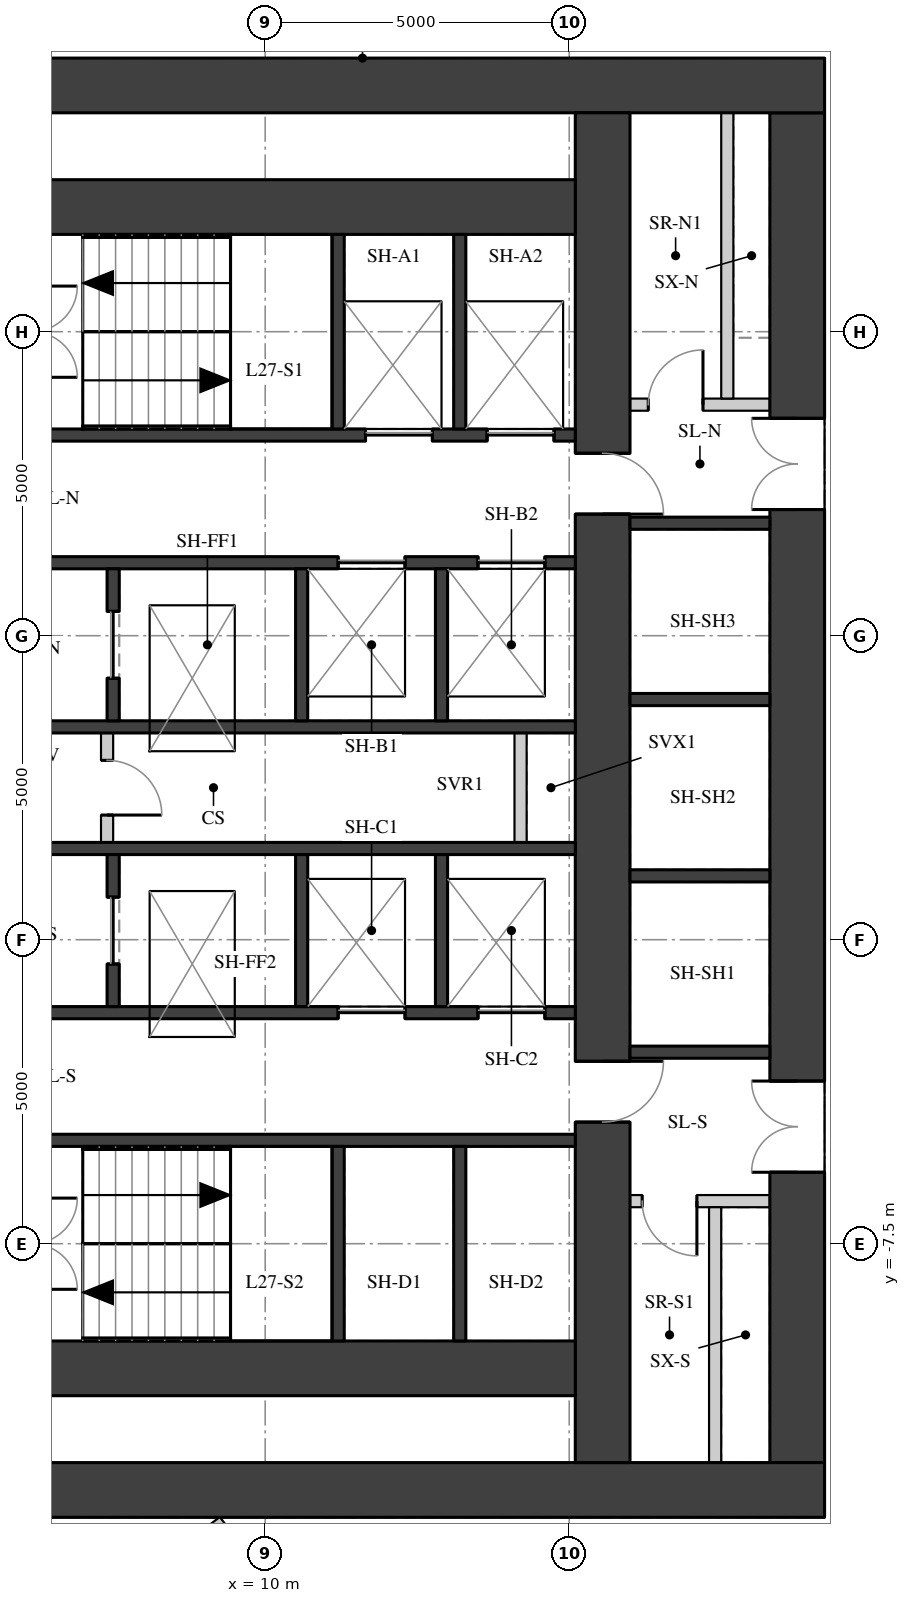
"""IFC4 building model, lengths in metres.
Left out: names, types, materials, properties, quantities, classifications, styles, units other than length and angle.
Written with IfcOpenShell. Run it as: python <this file> out.ifc"""

import sys

from ifc_helpers import new_model, si_unit, direction, frame, frame_2d, origin, place, context, subcontext, project, spatial, rectangle, extrude, element, fill, save


model = new_model("IFC4")
c1 = context("Model", 3, precision=1e-05, world=origin(), true_north=direction((0.0, 1.0)))
c2 = subcontext(c1, "Body", "Model", "MODEL_VIEW")
j1 = project(units=[si_unit("LENGTHUNIT", "METRE"), si_unit("PLANEANGLEUNIT", "RADIAN")], contexts=[c1])
p1 = place(None, origin())
s1 = spatial("IfcSite", under=j1, at=p1, CompositionType="ELEMENT")
p2 = place(p1, origin())
s2 = spatial("IfcBuilding", under=s1, at=p2, CompositionType="ELEMENT")
p3 = place(p2, frame((0.0, 0.0, 98.8)))
s3 = spatial("IfcBuildingStorey", under=s2, at=p3, CompositionType="ELEMENT", Elevation=98.8)
p4 = place(p3, frame((18.75, -11.1, 0.0), z_axis=(0.0, 0.0, 1.0), x_axis=(0.0, 1.0, 0.0)))
e1 = element("IfcWall", 1, at=p4, inside=s3, PredefinedType="SHEAR", context=c2, shape_type="SweptSolid", body=[
    extrude(rectangle(XDim=22.2, YDim=0.9, at=frame_2d((11.1, 0.0))), origin(), (0.0, 0.0, 1.0), 3.02),
])
p5 = place(p4, frame((15.675, 0.0, 0.0)))
e2 = element("IfcOpeningElement", 2, at=p5, cuts=e1, PredefinedType="OPENING", context=c2, shape_type="SweptSolid", body=[
    extrude(rectangle(XDim=1.5, YDim=2.1, at=frame_2d((0.75, 1.05))), frame((0.0, 0.46, 0.0), z_axis=(0.0, -1.0, 0.0), x_axis=(1.0, 0.0, 0.0)), (0.0, 0.0, 1.0), 0.92),
])
p6 = place(p4, frame((4.775, 0.0, 0.0)))
e3 = element("IfcOpeningElement", 3, at=p6, cuts=e1, PredefinedType="OPENING", context=c2, shape_type="SweptSolid", body=[
    extrude(rectangle(XDim=1.5, YDim=2.1, at=frame_2d((0.75, 1.05))), frame((0.0, 0.46, 0.0), z_axis=(0.0, -1.0, 0.0), x_axis=(1.0, 0.0, 0.0)), (0.0, 0.0, 1.0), 0.92),
])
for number, where, z_axis, x_axis in (
    (4, (4.0, 11.55, 0.0), (0.0, 0.0, 1.0), (1.0, 0.0, 0.0)),
    (5, (4.0, -11.55, 0.0), (0.0, 0.0, 1.0), (1.0, 0.0, 0.0)),
):
    element("IfcWall", number, at=place(p3, frame(where, z_axis=z_axis, x_axis=x_axis)), inside=s3, PredefinedType="SHEAR", context=c2, shape_type="SweptSolid", body=[
        extrude(rectangle(XDim=15.2, YDim=0.9, at=frame_2d((7.6, 0.0))), origin(), (0.0, 0.0, 1.0), 3.02),
    ])
p7 = place(p3, frame((15.55, -11.1, 0.0), z_axis=(0.0, 0.0, 1.0), x_axis=(0.0, 1.0, 0.0)))
e6 = element("IfcWall", 6, at=p7, inside=s3, PredefinedType="SHEAR", context=c2, shape_type="SweptSolid", body=[
    extrude(rectangle(XDim=22.2, YDim=0.9, at=frame_2d((11.1, 0.0))), origin(), (0.0, 0.0, 1.0), 3.02),
])
p8 = place(p7, frame((15.6, 0.0, 0.0)))
e7 = element("IfcOpeningElement", 7, at=p8, cuts=e6, PredefinedType="OPENING", context=c2, shape_type="SweptSolid", body=[
    extrude(rectangle(XDim=1.0, YDim=2.1, at=frame_2d((0.5, 1.05))), frame((0.0, 0.46, 0.0), z_axis=(0.0, -1.0, 0.0), x_axis=(1.0, 0.0, 0.0)), (0.0, 0.0, 1.0), 0.92),
])
p9 = place(p7, frame((5.6, 0.0, 0.0)))
e8 = element("IfcOpeningElement", 8, at=p9, cuts=e6, PredefinedType="OPENING", context=c2, shape_type="SweptSolid", body=[
    extrude(rectangle(XDim=1.0, YDim=2.1, at=frame_2d((0.5, 1.05))), frame((0.0, 0.46, 0.0), z_axis=(0.0, -1.0, 0.0), x_axis=(1.0, 0.0, 0.0)), (0.0, 0.0, 1.0), 0.92),
])
for number, where, z_axis, x_axis in (
    (9, (4.9, 9.55, 0.0), (0.0, 0.0, 1.0), (1.0, 0.0, 0.0)),
    (10, (4.9, -9.55, 0.0), (0.0, 0.0, 1.0), (1.0, 0.0, 0.0)),
):
    element("IfcWall", number, at=place(p3, frame(where, z_axis=z_axis, x_axis=x_axis)), inside=s3, PredefinedType="SHEAR", context=c2, shape_type="SweptSolid", body=[
        extrude(rectangle(XDim=10.2, YDim=0.9, at=frame_2d((5.1, 0.0))), origin(), (0.0, 0.0, 1.0), 3.02),
    ])
p10 = place(p3, frame((4.9, 5.8, 0.0), z_axis=(0.0, 0.0, 1.0), x_axis=(1.0, 0.0, 0.0)))
e11 = element("IfcWall", 11, at=p10, inside=s3, PredefinedType="SHEAR", context=c2, shape_type="SweptSolid", body=[
    extrude(rectangle(XDim=10.2, YDim=0.2, at=frame_2d((5.1, 0.0))), origin(), (0.0, 0.0, 1.0), 3.02),
])
p11 = place(p10, frame((6.75, 0.0, 0.0)))
e12 = element("IfcOpeningElement", 12, at=p11, cuts=e11, PredefinedType="OPENING", context=c2, shape_type="SweptSolid", body=[
    extrude(rectangle(XDim=1.1, YDim=2.1, at=frame_2d((0.55, 1.05))), frame((0.0, 0.11, 0.0), z_axis=(0.0, -1.0, 0.0), x_axis=(1.0, 0.0, 0.0)), (0.0, 0.0, 1.0), 0.22),
])
p12 = place(p10, frame((8.75, 0.0, 0.0)))
e13 = element("IfcOpeningElement", 13, at=p12, cuts=e11, PredefinedType="OPENING", context=c2, shape_type="SweptSolid", body=[
    extrude(rectangle(XDim=1.1, YDim=2.1, at=frame_2d((0.55, 1.05))), frame((0.0, 0.11, 0.0), z_axis=(0.0, -1.0, 0.0), x_axis=(1.0, 0.0, 0.0)), (0.0, 0.0, 1.0), 0.22),
])
p13 = place(p3, frame((4.9, 3.7, 0.0), z_axis=(0.0, 0.0, 1.0), x_axis=(1.0, 0.0, 0.0)))
e14 = element("IfcWall", 14, at=p13, inside=s3, PredefinedType="SHEAR", context=c2, shape_type="SweptSolid", body=[
    extrude(rectangle(XDim=10.2, YDim=0.2, at=frame_2d((5.1, 0.0))), origin(), (0.0, 0.0, 1.0), 3.02),
])
p14 = place(p13, frame((6.3, 0.0, 0.0)))
e15 = element("IfcOpeningElement", 15, at=p14, cuts=e14, PredefinedType="OPENING", context=c2, shape_type="SweptSolid", body=[
    extrude(rectangle(XDim=1.1, YDim=2.1, at=frame_2d((0.55, 1.05))), frame((0.0, 0.11, 0.0), z_axis=(0.0, -1.0, 0.0), x_axis=(1.0, 0.0, 0.0)), (0.0, 0.0, 1.0), 0.22),
])
p15 = place(p13, frame((8.6, 0.0, 0.0)))
e16 = element("IfcOpeningElement", 16, at=p15, cuts=e14, PredefinedType="OPENING", context=c2, shape_type="SweptSolid", body=[
    extrude(rectangle(XDim=1.1, YDim=2.1, at=frame_2d((0.55, 1.05))), frame((0.0, 0.11, 0.0), z_axis=(0.0, -1.0, 0.0), x_axis=(1.0, 0.0, 0.0)), (0.0, 0.0, 1.0), 0.22),
])
for number, where, z_axis, x_axis in (
    (17, (4.9, 1.0, 0.0), (0.0, 0.0, 1.0), (1.0, 0.0, 0.0)),
    (18, (4.9, -1.0, 0.0), (0.0, 0.0, 1.0), (1.0, 0.0, 0.0)),
):
    element("IfcWall", number, at=place(p3, frame(where, z_axis=z_axis, x_axis=x_axis)), inside=s3, PredefinedType="SHEAR", context=c2, shape_type="SweptSolid", body=[
        extrude(rectangle(XDim=10.2, YDim=0.2, at=frame_2d((5.1, 0.0))), origin(), (0.0, 0.0, 1.0), 3.02),
    ])
p16 = place(p3, frame((4.9, -3.7, 0.0), z_axis=(0.0, 0.0, 1.0), x_axis=(1.0, 0.0, 0.0)))
e19 = element("IfcWall", 19, at=p16, inside=s3, PredefinedType="SHEAR", context=c2, shape_type="SweptSolid", body=[
    extrude(rectangle(XDim=10.2, YDim=0.2, at=frame_2d((5.1, 0.0))), origin(), (0.0, 0.0, 1.0), 3.02),
])
p17 = place(p16, frame((6.3, 0.0, 0.0)))
e20 = element("IfcOpeningElement", 20, at=p17, cuts=e19, PredefinedType="OPENING", context=c2, shape_type="SweptSolid", body=[
    extrude(rectangle(XDim=1.1, YDim=2.1, at=frame_2d((0.55, 1.05))), frame((0.0, 0.11, 0.0), z_axis=(0.0, -1.0, 0.0), x_axis=(1.0, 0.0, 0.0)), (0.0, 0.0, 1.0), 0.22),
])
p18 = place(p16, frame((8.6, 0.0, 0.0)))
e21 = element("IfcOpeningElement", 21, at=p18, cuts=e19, PredefinedType="OPENING", context=c2, shape_type="SweptSolid", body=[
    extrude(rectangle(XDim=1.1, YDim=2.1, at=frame_2d((0.55, 1.05))), frame((0.0, 0.11, 0.0), z_axis=(0.0, -1.0, 0.0), x_axis=(1.0, 0.0, 0.0)), (0.0, 0.0, 1.0), 0.22),
])
p19 = place(p3, frame((4.9, -5.8, 0.0), z_axis=(0.0, 0.0, 1.0), x_axis=(1.0, 0.0, 0.0)))
e22 = element("IfcWall", 22, at=p19, inside=s3, PredefinedType="SHEAR", context=c2, shape_type="SweptSolid", body=[
    extrude(rectangle(XDim=10.2, YDim=0.2, at=frame_2d((5.1, 0.0))), origin(), (0.0, 0.0, 1.0), 3.02),
])
for number, where, z_axis, x_axis in (
    (23, (11.2, 5.9, 0.0), (0.0, 0.0, 1.0), (0.0, 1.0, 0.0)),
    (24, (11.2, -9.1, 0.0), (0.0, 0.0, 1.0), (0.0, 1.0, 0.0)),
    (25, (13.2, 5.9, 0.0), (0.0, 0.0, 1.0), (0.0, 1.0, 0.0)),
    (26, (13.2, -9.1, 0.0), (0.0, 0.0, 1.0), (0.0, 1.0, 0.0)),
):
    element("IfcWall", number, at=place(p3, frame(where, z_axis=z_axis, x_axis=x_axis)), inside=s3, PredefinedType="SHEAR", context=c2, shape_type="SweptSolid", body=[
        extrude(rectangle(XDim=3.2, YDim=0.2, at=frame_2d((1.6, 0.0))), origin(), (0.0, 0.0, 1.0), 3.02),
    ])
p20 = place(p3, frame((7.5, 1.1, 0.0), z_axis=(0.0, 0.0, 1.0), x_axis=(0.0, 1.0, 0.0)))
e27 = element("IfcWall", 27, at=p20, inside=s3, PredefinedType="SHEAR", context=c2, shape_type="SweptSolid", body=[
    extrude(rectangle(XDim=2.5, YDim=0.2, at=frame_2d((1.25, 0.0))), origin(), (0.0, 0.0, 1.0), 3.02),
])
p21 = place(p20, frame((0.7, 0.0, 0.0)))
e28 = element("IfcOpeningElement", 28, at=p21, cuts=e27, PredefinedType="OPENING", context=c2, shape_type="SweptSolid", body=[
    extrude(rectangle(XDim=1.1, YDim=2.1, at=frame_2d((0.55, 1.05))), frame((0.0, 0.11, 0.0), z_axis=(0.0, -1.0, 0.0), x_axis=(1.0, 0.0, 0.0)), (0.0, 0.0, 1.0), 0.22),
])
p22 = place(p3, frame((7.5, -3.6, 0.0), z_axis=(0.0, 0.0, 1.0), x_axis=(0.0, 1.0, 0.0)))
e29 = element("IfcWall", 29, at=p22, inside=s3, PredefinedType="SHEAR", context=c2, shape_type="SweptSolid", body=[
    extrude(rectangle(XDim=2.5, YDim=0.2, at=frame_2d((1.25, 0.0))), origin(), (0.0, 0.0, 1.0), 3.02),
])
p23 = place(p22, frame((0.7, 0.0, 0.0)))
e30 = element("IfcOpeningElement", 30, at=p23, cuts=e29, PredefinedType="OPENING", context=c2, shape_type="SweptSolid", body=[
    extrude(rectangle(XDim=1.1, YDim=2.1, at=frame_2d((0.55, 1.05))), frame((0.0, 0.11, 0.0), z_axis=(0.0, -1.0, 0.0), x_axis=(1.0, 0.0, 0.0)), (0.0, 0.0, 1.0), 0.22),
])
for number, where, z_axis, x_axis in (
    (31, (10.6, 1.1, 0.0), (0.0, 0.0, 1.0), (0.0, 1.0, 0.0)),
    (32, (10.6, -3.6, 0.0), (0.0, 0.0, 1.0), (0.0, 1.0, 0.0)),
    (33, (12.9, 1.1, 0.0), (0.0, 0.0, 1.0), (0.0, 1.0, 0.0)),
    (34, (12.9, -3.6, 0.0), (0.0, 0.0, 1.0), (0.0, 1.0, 0.0)),
):
    element("IfcWall", number, at=place(p3, frame(where, z_axis=z_axis, x_axis=x_axis)), inside=s3, PredefinedType="SHEAR", context=c2, shape_type="SweptSolid", body=[
        extrude(rectangle(XDim=2.5, YDim=0.2, at=frame_2d((1.25, 0.0))), origin(), (0.0, 0.0, 1.0), 3.02),
    ])
p24 = place(p3, frame((7.4, -0.9, 0.0), z_axis=(0.0, 0.0, 1.0), x_axis=(0.0, 1.0, 0.0)))
e35 = element("IfcWall", 35, at=p24, inside=s3, PredefinedType="PARTITIONING", context=c2, shape_type="SweptSolid", body=[
    extrude(rectangle(XDim=1.8, YDim=0.2, at=frame_2d((0.9, 0.0))), origin(), (0.0, 0.0, 1.0), 3.02),
])
p25 = place(p24, frame((0.45, 0.0, 0.0)))
e36 = element("IfcOpeningElement", 36, at=p25, cuts=e35, PredefinedType="OPENING", context=c2, shape_type="SweptSolid", body=[
    extrude(rectangle(XDim=0.9, YDim=2.1, at=frame_2d((0.45, 1.05))), frame((0.0, 0.11, 0.0), z_axis=(0.0, -1.0, 0.0), x_axis=(1.0, 0.0, 0.0)), (0.0, 0.0, 1.0), 0.22),
])
p26 = place(p3, frame((14.2, -0.9, 0.0), z_axis=(0.0, 0.0, 1.0), x_axis=(0.0, 1.0, 0.0)))
e37 = element("IfcWall", 37, at=p26, inside=s3, PredefinedType="PARTITIONING", context=c2, shape_type="SweptSolid", body=[
    extrude(rectangle(XDim=1.8, YDim=0.2, at=frame_2d((0.9, 0.0))), origin(), (0.0, 0.0, 1.0), 3.02),
])
for number, where, z_axis, x_axis in (
    (38, (16.0, -4.35, 0.0), (0.0, 0.0, 1.0), (1.0, 0.0, 0.0)),
    (39, (16.0, -1.45, 0.0), (0.0, 0.0, 1.0), (1.0, 0.0, 0.0)),
    (40, (16.0, 1.45, 0.0), (0.0, 0.0, 1.0), (1.0, 0.0, 0.0)),
    (41, (16.0, 4.35, 0.0), (0.0, 0.0, 1.0), (1.0, 0.0, 0.0)),
):
    element("IfcWall", number, at=place(p3, frame(where, z_axis=z_axis, x_axis=x_axis)), inside=s3, PredefinedType="SHEAR", context=c2, shape_type="SweptSolid", body=[
        extrude(rectangle(XDim=2.3, YDim=0.2, at=frame_2d((1.15, 0.0))), origin(), (0.0, 0.0, 1.0), 3.02),
    ])
p27 = place(p3, frame((16.0, 6.3, 0.0), z_axis=(0.0, 0.0, 1.0), x_axis=(1.0, 0.0, 0.0)))
e42 = element("IfcWall", 42, at=p27, inside=s3, PredefinedType="PARTITIONING", context=c2, shape_type="SweptSolid", body=[
    extrude(rectangle(XDim=2.3, YDim=0.2, at=frame_2d((1.15, 0.0))), origin(), (0.0, 0.0, 1.0), 3.02),
])
p28 = place(p27, frame((0.3, 0.0, 0.0)))
e43 = element("IfcOpeningElement", 43, at=p28, cuts=e42, PredefinedType="OPENING", context=c2, shape_type="SweptSolid", body=[
    extrude(rectangle(XDim=0.9, YDim=2.1, at=frame_2d((0.45, 1.05))), frame((0.0, 0.11, 0.0), z_axis=(0.0, -1.0, 0.0), x_axis=(1.0, 0.0, 0.0)), (0.0, 0.0, 1.0), 0.22),
])
p29 = place(p3, frame((17.6, 6.4, 0.0), z_axis=(0.0, 0.0, 1.0), x_axis=(0.0, 1.0, 0.0)))
e44 = element("IfcWall", 44, at=p29, inside=s3, PredefinedType="PARTITIONING", context=c2, shape_type="SweptSolid", body=[
    extrude(rectangle(XDim=4.7, YDim=0.2, at=frame_2d((2.35, 0.0))), origin(), (0.0, 0.0, 1.0), 3.02),
])
p30 = place(p3, frame((16.0, -6.8, 0.0), z_axis=(0.0, 0.0, 1.0), x_axis=(1.0, 0.0, 0.0)))
e45 = element("IfcWall", 45, at=p30, inside=s3, PredefinedType="PARTITIONING", context=c2, shape_type="SweptSolid", body=[
    extrude(rectangle(XDim=2.3, YDim=0.2, at=frame_2d((1.15, 0.0))), origin(), (0.0, 0.0, 1.0), 3.02),
])
p31 = place(p30, frame((0.2, 0.0, 0.0)))
e46 = element("IfcOpeningElement", 46, at=p31, cuts=e45, PredefinedType="OPENING", context=c2, shape_type="SweptSolid", body=[
    extrude(rectangle(XDim=0.9, YDim=2.1, at=frame_2d((0.45, 1.05))), frame((0.0, 0.11, 0.0), z_axis=(0.0, -1.0, 0.0), x_axis=(1.0, 0.0, 0.0)), (0.0, 0.0, 1.0), 0.22),
])
p32 = place(p3, frame((17.4, -11.1, 0.0), z_axis=(0.0, 0.0, 1.0), x_axis=(0.0, 1.0, 0.0)))
e47 = element("IfcWall", 47, at=p32, inside=s3, PredefinedType="PARTITIONING", context=c2, shape_type="SweptSolid", body=[
    extrude(rectangle(XDim=4.2, YDim=0.2, at=frame_2d((2.1, 0.0))), origin(), (0.0, 0.0, 1.0), 3.02),
])
p33 = place(p3, frame((9.3, -12.055, 0.0), z_axis=(0.0, 0.0, 1.0), x_axis=(-0.79762360872, -0.603155517933, 0.0)))
e48 = element("IfcWall", 48, at=p33, inside=s3, PredefinedType="PARTITIONING", context=c2, shape_type="SweptSolid", body=[
    extrude(rectangle(XDim=3.288, YDim=0.15, at=frame_2d((1.644, 0.0))), origin(), (0.0, 0.0, 1.0), 3.02),
])
p34 = place(p5, origin())
e49 = element("IfcDoor", 49, at=p34, inside=s3, OperationType="DOUBLE_DOOR_SINGLE_SWING", PredefinedType="DOOR", context=c2, shape_type="SweptSolid", body=[
    extrude(rectangle(XDim=1.5, YDim=2.1, at=frame_2d((0.75, 1.05))), frame((0.0, 0.025, 0.0), z_axis=(0.0, -1.0, 0.0), x_axis=(1.0, 0.0, 0.0)), (0.0, 0.0, 1.0), 0.05),
])
fill(e2, e49)
p35 = place(p6, origin())
e50 = element("IfcDoor", 50, at=p35, inside=s3, OperationType="DOUBLE_DOOR_SINGLE_SWING", PredefinedType="DOOR", context=c2, shape_type="SweptSolid", body=[
    extrude(rectangle(XDim=1.5, YDim=2.1, at=frame_2d((0.75, 1.05))), frame((0.0, 0.025, 0.0), z_axis=(0.0, -1.0, 0.0), x_axis=(1.0, 0.0, 0.0)), (0.0, 0.0, 1.0), 0.05),
])
fill(e3, e50)
p36 = place(p11, origin())
e51 = element("IfcDoor", 51, at=p36, inside=s3, OperationType="DOUBLE_DOOR_SLIDING", PredefinedType="DOOR", context=c2, shape_type="SweptSolid", body=[
    extrude(rectangle(XDim=1.1, YDim=2.1, at=frame_2d((0.55, 1.05))), frame((0.0, 0.025, 0.0), z_axis=(0.0, -1.0, 0.0), x_axis=(1.0, 0.0, 0.0)), (0.0, 0.0, 1.0), 0.05),
])
fill(e12, e51)
p37 = place(p12, origin())
e52 = element("IfcDoor", 52, at=p37, inside=s3, OperationType="DOUBLE_DOOR_SLIDING", PredefinedType="DOOR", context=c2, shape_type="SweptSolid", body=[
    extrude(rectangle(XDim=1.1, YDim=2.1, at=frame_2d((0.55, 1.05))), frame((0.0, 0.025, 0.0), z_axis=(0.0, -1.0, 0.0), x_axis=(1.0, 0.0, 0.0)), (0.0, 0.0, 1.0), 0.05),
])
fill(e13, e52)
p38 = place(p14, origin())
e53 = element("IfcDoor", 53, at=p38, inside=s3, OperationType="DOUBLE_DOOR_SLIDING", PredefinedType="DOOR", context=c2, shape_type="SweptSolid", body=[
    extrude(rectangle(XDim=1.1, YDim=2.1, at=frame_2d((0.55, 1.05))), frame((0.0, 0.025, 0.0), z_axis=(0.0, -1.0, 0.0), x_axis=(1.0, 0.0, 0.0)), (0.0, 0.0, 1.0), 0.05),
])
fill(e15, e53)
p39 = place(p15, origin())
e54 = element("IfcDoor", 54, at=p39, inside=s3, OperationType="DOUBLE_DOOR_SLIDING", PredefinedType="DOOR", context=c2, shape_type="SweptSolid", body=[
    extrude(rectangle(XDim=1.1, YDim=2.1, at=frame_2d((0.55, 1.05))), frame((0.0, 0.025, 0.0), z_axis=(0.0, -1.0, 0.0), x_axis=(1.0, 0.0, 0.0)), (0.0, 0.0, 1.0), 0.05),
])
fill(e16, e54)
p40 = place(p17, origin())
e55 = element("IfcDoor", 55, at=p40, inside=s3, OperationType="DOUBLE_DOOR_SLIDING", PredefinedType="DOOR", context=c2, shape_type="SweptSolid", body=[
    extrude(rectangle(XDim=1.1, YDim=2.1, at=frame_2d((0.55, 1.05))), frame((0.0, 0.025, 0.0), z_axis=(0.0, -1.0, 0.0), x_axis=(1.0, 0.0, 0.0)), (0.0, 0.0, 1.0), 0.05),
])
fill(e20, e55)
p41 = place(p18, origin())
e56 = element("IfcDoor", 56, at=p41, inside=s3, OperationType="DOUBLE_DOOR_SLIDING", PredefinedType="DOOR", context=c2, shape_type="SweptSolid", body=[
    extrude(rectangle(XDim=1.1, YDim=2.1, at=frame_2d((0.55, 1.05))), frame((0.0, 0.025, 0.0), z_axis=(0.0, -1.0, 0.0), x_axis=(1.0, 0.0, 0.0)), (0.0, 0.0, 1.0), 0.05),
])
fill(e21, e56)
p42 = place(p21, origin())
e57 = element("IfcDoor", 57, at=p42, inside=s3, OperationType="DOUBLE_DOOR_SLIDING", PredefinedType="DOOR", context=c2, shape_type="SweptSolid", body=[
    extrude(rectangle(XDim=1.1, YDim=2.1, at=frame_2d((0.55, 1.05))), frame((0.0, 0.025, 0.0), z_axis=(0.0, -1.0, 0.0), x_axis=(1.0, 0.0, 0.0)), (0.0, 0.0, 1.0), 0.05),
])
fill(e28, e57)
p43 = place(p23, origin())
e58 = element("IfcDoor", 58, at=p43, inside=s3, OperationType="DOUBLE_DOOR_SLIDING", PredefinedType="DOOR", context=c2, shape_type="SweptSolid", body=[
    extrude(rectangle(XDim=1.1, YDim=2.1, at=frame_2d((0.55, 1.05))), frame((0.0, 0.025, 0.0), z_axis=(0.0, -1.0, 0.0), x_axis=(1.0, 0.0, 0.0)), (0.0, 0.0, 1.0), 0.05),
])
fill(e30, e58)
p44 = place(p25, origin())
e59 = element("IfcDoor", 59, at=p44, inside=s3, OperationType="SINGLE_SWING_RIGHT", PredefinedType="DOOR", context=c2, shape_type="SweptSolid", body=[
    extrude(rectangle(XDim=0.9, YDim=2.1, at=frame_2d((0.45, 1.05))), frame((0.0, 0.025, 0.0), z_axis=(0.0, -1.0, 0.0), x_axis=(1.0, 0.0, 0.0)), (0.0, 0.0, 1.0), 0.05),
])
fill(e36, e59)
p45 = place(p8, origin())
e60 = element("IfcDoor", 60, at=p45, inside=s3, OperationType="SINGLE_SWING_RIGHT", PredefinedType="DOOR", context=c2, shape_type="SweptSolid", body=[
    extrude(rectangle(XDim=1.0, YDim=2.1, at=frame_2d((0.5, 1.05))), frame((0.0, 0.025, 0.0), z_axis=(0.0, -1.0, 0.0), x_axis=(1.0, 0.0, 0.0)), (0.0, 0.0, 1.0), 0.05),
])
fill(e7, e60)
p46 = place(p28, origin())
e61 = element("IfcDoor", 61, at=p46, inside=s3, OperationType="SINGLE_SWING_RIGHT", PredefinedType="DOOR", context=c2, shape_type="SweptSolid", body=[
    extrude(rectangle(XDim=0.9, YDim=2.1, at=frame_2d((0.45, 1.05))), frame((0.0, 0.025, 0.0), z_axis=(0.0, -1.0, 0.0), x_axis=(1.0, 0.0, 0.0)), (0.0, 0.0, 1.0), 0.05),
])
fill(e43, e61)
p47 = place(p9, origin())
e62 = element("IfcDoor", 62, at=p47, inside=s3, OperationType="SINGLE_SWING_LEFT", PredefinedType="DOOR", context=c2, shape_type="SweptSolid", body=[
    extrude(rectangle(XDim=1.0, YDim=2.1, at=frame_2d((0.5, 1.05))), frame((0.0, 0.025, 0.0), z_axis=(0.0, -1.0, 0.0), x_axis=(1.0, 0.0, 0.0)), (0.0, 0.0, 1.0), 0.05),
])
fill(e8, e62)
p48 = place(p31, origin())
e63 = element("IfcDoor", 63, at=p48, inside=s3, OperationType="SINGLE_SWING_LEFT", PredefinedType="DOOR", context=c2, shape_type="SweptSolid", body=[
    extrude(rectangle(XDim=0.9, YDim=2.1, at=frame_2d((0.45, 1.05))), frame((0.0, 0.025, 0.0), z_axis=(0.0, -1.0, 0.0), x_axis=(1.0, 0.0, 0.0)), (0.0, 0.0, 1.0), 0.05),
])
fill(e46, e63)
save(model, sys.argv[1])
